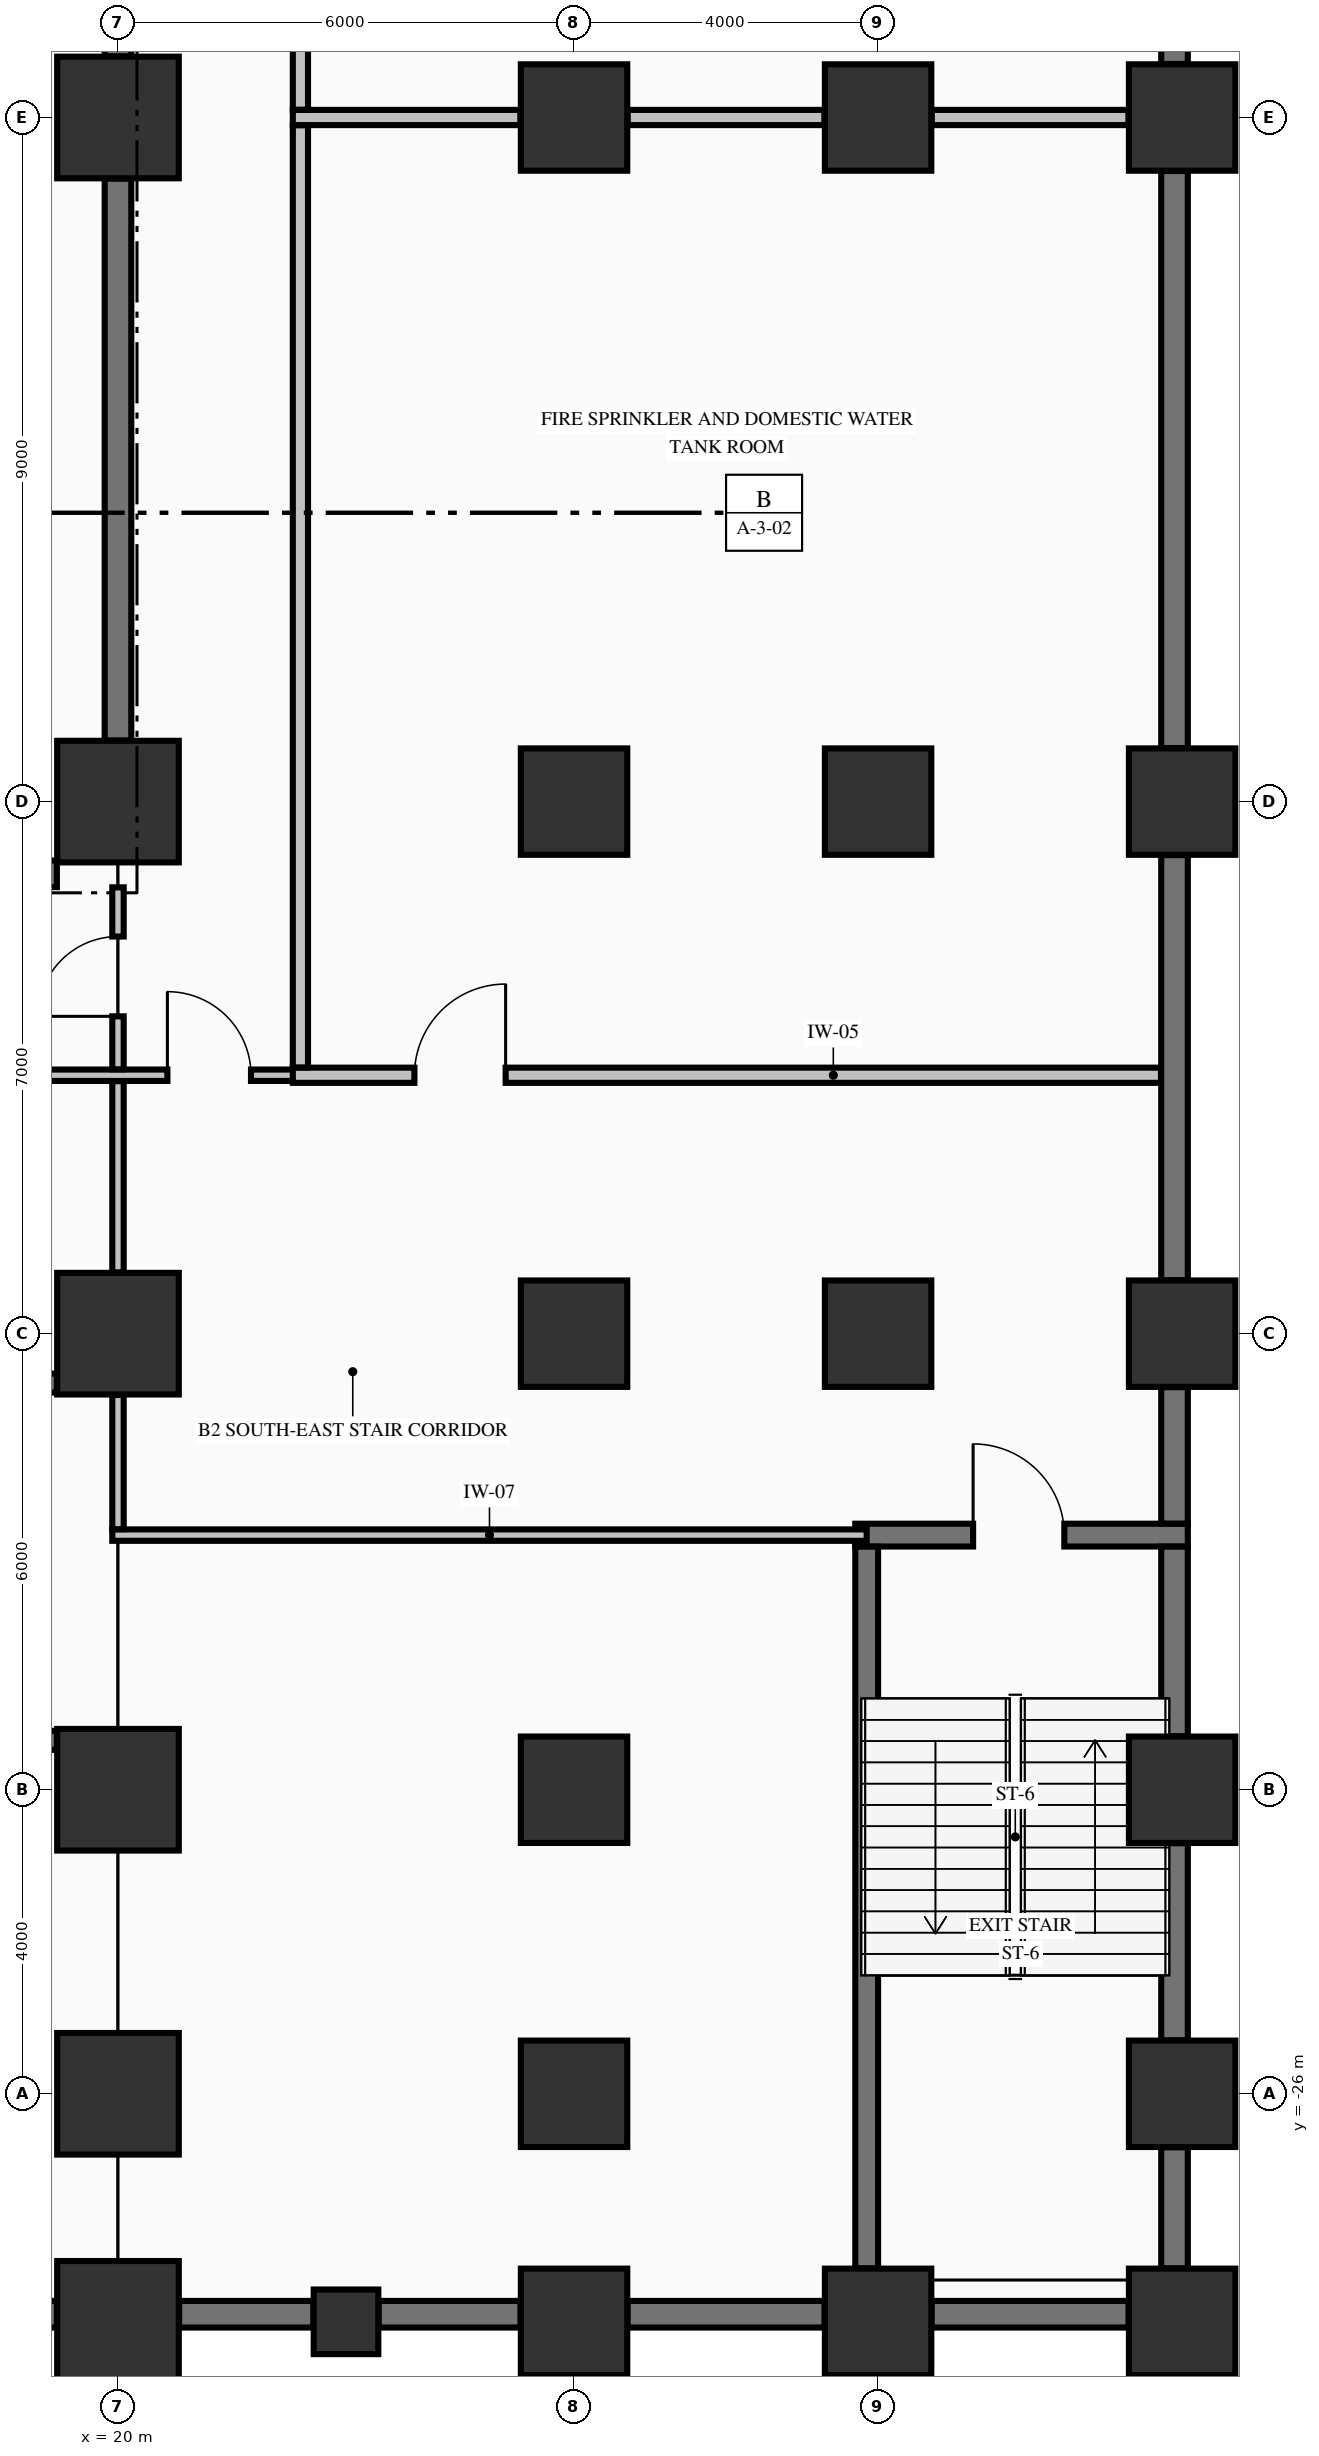
"""IFC4 building model, lengths in metres.
Left out: names, types, materials, properties, quantities, classifications, styles, units other than length and angle.
Written with IfcOpenShell. Run it as: python <this file> out.ifc"""

import sys

from ifc_helpers import new_model, si_unit, direction, frame, frame_2d, origin, origin_2d, place, context, subcontext, project, spatial, rectangle, extrude, element, fill, save


model = new_model("IFC4")
c1 = context("Model", 3, precision=1e-05, world=origin(), true_north=direction((0.0, 1.0)))
c2 = subcontext(c1, "Body", "Model", "MODEL_VIEW")
j1 = project(units=[si_unit("LENGTHUNIT", "METRE"), si_unit("PLANEANGLEUNIT", "RADIAN")], contexts=[c1])
p1 = place(None, origin())
s1 = spatial("IfcSite", under=j1, at=p1, CompositionType="ELEMENT")
p2 = place(p1, origin())
s2 = spatial("IfcBuilding", under=s1, at=p2, CompositionType="ELEMENT")
p3 = place(p2, frame((0.0, 0.0, -9.1)))
s3 = spatial("IfcBuildingStorey", under=s2, at=p3, CompositionType="ELEMENT", Elevation=-9.1)
for number, where, z_axis, x_axis in (
    (1, (20.0, -29.0, -0.45), (0.0, 0.0, 1.0), (1.0, 0.0, 0.0)),
    (2, (20.0, -26.0, -0.45), (0.0, 0.0, 1.0), (1.0, 0.0, 0.0)),
    (3, (20.0, -22.0, -0.45), (0.0, 0.0, 1.0), (1.0, 0.0, 0.0)),
    (4, (20.0, -16.0, -0.45), (0.0, 0.0, 1.0), (1.0, 0.0, 0.0)),
    (5, (20.0, -9.0, -0.45), (0.0, 0.0, 1.0), (1.0, 0.0, 0.0)),
    (6, (20.0, 0.0, -0.45), (0.0, 0.0, 1.0), (1.0, 0.0, 0.0)),
):
    element("IfcColumn", number, at=place(p3, frame(where, z_axis=z_axis, x_axis=x_axis)), inside=s3, PredefinedType="COLUMN", context=c2, shape_type="SweptSolid", body=[
        extrude(rectangle(XDim=1.6, YDim=1.6, at=origin_2d()), origin(), (0.0, 0.0, 1.0), 4.65),
    ])
for number, where, z_axis, x_axis in (
    (7, (26.0, -29.0, -0.45), (0.0, 0.0, 1.0), (1.0, 0.0, 0.0)),
    (8, (26.0, -26.0, -0.45), (0.0, 0.0, 1.0), (1.0, 0.0, 0.0)),
    (9, (26.0, -22.0, -0.45), (0.0, 0.0, 1.0), (1.0, 0.0, 0.0)),
    (10, (26.0, -16.0, -0.45), (0.0, 0.0, 1.0), (1.0, 0.0, 0.0)),
    (11, (26.0, -9.0, -0.45), (0.0, 0.0, 1.0), (1.0, 0.0, 0.0)),
    (12, (26.0, 0.0, -0.45), (0.0, 0.0, 1.0), (1.0, 0.0, 0.0)),
    (13, (30.0, -29.0, -0.45), (0.0, 0.0, 1.0), (1.0, 0.0, 0.0)),
    (14, (30.0, -16.0, -0.45), (0.0, 0.0, 1.0), (1.0, 0.0, 0.0)),
    (15, (30.0, -9.0, -0.45), (0.0, 0.0, 1.0), (1.0, 0.0, 0.0)),
    (16, (30.0, 0.0, -0.45), (0.0, 0.0, 1.0), (1.0, 0.0, 0.0)),
    (17, (34.0, -29.0, -0.45), (0.0, 0.0, 1.0), (1.0, 0.0, 0.0)),
    (18, (34.0, -26.0, -0.45), (0.0, 0.0, 1.0), (1.0, 0.0, 0.0)),
    (19, (34.0, -22.0, -0.45), (0.0, 0.0, 1.0), (1.0, 0.0, 0.0)),
    (20, (34.0, -16.0, -0.45), (0.0, 0.0, 1.0), (1.0, 0.0, 0.0)),
    (21, (34.0, -9.0, -0.45), (0.0, 0.0, 1.0), (1.0, 0.0, 0.0)),
    (22, (34.0, 0.0, -0.45), (0.0, 0.0, 1.0), (1.0, 0.0, 0.0)),
):
    element("IfcColumn", number, at=place(p3, frame(where, z_axis=z_axis, x_axis=x_axis)), inside=s3, PredefinedType="COLUMN", context=c2, shape_type="SweptSolid", body=[
        extrude(rectangle(XDim=1.4, YDim=1.4, at=origin_2d()), origin(), (0.0, 0.0, 1.0), 4.65),
    ])
p4 = place(p3, frame((23.0, -29.0, -0.45), z_axis=(0.0, 0.0, 1.0), x_axis=(1.0, 0.0, 0.0)))
e23 = element("IfcColumn", 23, at=p4, inside=s3, PredefinedType="PILASTER", context=c2, shape_type="SweptSolid", body=[
    extrude(rectangle(XDim=0.85, YDim=0.85, at=origin_2d()), origin(), (0.0, 0.0, 1.0), 4.65),
])
p5 = place(p3, frame((11.804, -28.9, 0.0), z_axis=(0.0, 0.0, 1.0), x_axis=(1.0, 0.0, 0.0)))
e24 = element("IfcWall", 24, at=p5, inside=s3, PredefinedType="SHEAR", context=c2, shape_type="SweptSolid", body=[
    extrude(rectangle(XDim=7.392, YDim=0.35, at=frame_2d((3.696, 0.0))), origin(), (0.0, 0.0, 1.0), 4.2),
])
p6 = place(p3, frame((20.804, -28.9, 0.0), z_axis=(0.0, 0.0, 1.0), x_axis=(1.0, 0.0, 0.0)))
e25 = element("IfcWall", 25, at=p6, inside=s3, PredefinedType="SHEAR", context=c2, shape_type="SweptSolid", body=[
    extrude(rectangle(XDim=1.767, YDim=0.35, at=frame_2d((0.884, 0.0))), origin(), (0.0, 0.0, 1.0), 4.2),
])
p7 = place(p3, frame((23.429, -28.9, 0.0), z_axis=(0.0, 0.0, 1.0), x_axis=(1.0, 0.0, 0.0)))
e26 = element("IfcWall", 26, at=p7, inside=s3, PredefinedType="SHEAR", context=c2, shape_type="SweptSolid", body=[
    extrude(rectangle(XDim=1.867, YDim=0.35, at=frame_2d((0.934, 0.0))), origin(), (0.0, 0.0, 1.0), 4.2),
])
for number, where, z_axis, x_axis in (
    (27, (26.704, -28.9, 0.0), (0.0, 0.0, 1.0), (1.0, 0.0, 0.0)),
    (28, (30.704, -28.9, 0.0), (0.0, 0.0, 1.0), (1.0, 0.0, 0.0)),
):
    element("IfcWall", number, at=place(p3, frame(where, z_axis=z_axis, x_axis=x_axis)), inside=s3, PredefinedType="SHEAR", context=c2, shape_type="SweptSolid", body=[
        extrude(rectangle(XDim=2.592, YDim=0.35, at=frame_2d((1.296, 0.0))), origin(), (0.0, 0.0, 1.0), 4.2),
    ])
p8 = place(p3, frame((11.804, -21.35, 0.0), z_axis=(0.0, 0.0, 1.0), x_axis=(1.0, 0.0, 0.0)))
e29 = element("IfcWall", 29, at=p8, inside=s3, PredefinedType="SOLIDWALL", context=c2, shape_type="SweptSolid", body=[
    extrude(rectangle(XDim=7.392, YDim=0.25, at=frame_2d((3.696, 0.0))), origin(), (0.0, 0.0, 1.0), 4.2),
])
p9 = place(p3, frame((29.7, -18.65, 0.0), z_axis=(0.0, 0.0, 1.0), x_axis=(1.0, 0.0, 0.0)))
e30 = element("IfcWall", 30, at=p9, inside=s3, PredefinedType="SHEAR", context=c2, shape_type="SweptSolid", body=[
    extrude(rectangle(XDim=4.375, YDim=0.3, at=frame_2d((2.188, 0.0))), origin(), (0.0, 0.0, 1.0), 4.2),
])
p10 = place(p9, frame((1.55, 0.0, 0.0)))
e31 = element("IfcOpeningElement", 31, at=p10, cuts=e30, PredefinedType="OPENING", context=c2, shape_type="SweptSolid", body=[
    extrude(rectangle(XDim=1.2, YDim=2.15, at=frame_2d((0.6, 1.075))), frame((0.0, 0.16, 0.0), z_axis=(0.0, -1.0, 0.0), x_axis=(1.0, 0.0, 0.0)), (0.0, 0.0, 1.0), 0.32),
])
p11 = place(p3, frame((11.804, -16.65, 0.0), z_axis=(0.0, 0.0, 1.0), x_axis=(1.0, 0.0, 0.0)))
e32 = element("IfcWall", 32, at=p11, inside=s3, PredefinedType="SOLIDWALL", context=c2, shape_type="SweptSolid", body=[
    extrude(rectangle(XDim=7.392, YDim=0.25, at=frame_2d((3.696, 0.0))), origin(), (0.0, 0.0, 1.0), 4.2),
])
p12 = place(p3, frame((14.7, -9.95, 0.0), z_axis=(0.0, 0.0, 1.0), x_axis=(1.0, 0.0, 0.0)))
e33 = element("IfcWall", 33, at=p12, inside=s3, PredefinedType="SHEAR", context=c2, shape_type="SweptSolid", body=[
    extrude(rectangle(XDim=4.496, YDim=0.35, at=frame_2d((2.248, 0.0))), origin(), (0.0, 0.0, 1.0), 4.2),
])
p13 = place(p3, frame((19.925, -18.65, 0.0), z_axis=(0.0, 0.0, 1.0), x_axis=(1.0, 0.0, 0.0)))
e34 = element("IfcWall", 34, at=p13, inside=s3, PredefinedType="PARTITIONING", context=c2, shape_type="SweptSolid", body=[
    extrude(rectangle(XDim=9.925, YDim=0.15, at=frame_2d((4.962, 0.0))), origin(), (0.0, 0.0, 1.0), 4.2),
])
p14 = place(p3, frame((-33.722, -12.6, 0.0), z_axis=(0.0, 0.0, 1.0), x_axis=(1.0, 0.0, 0.0)))
e35 = element("IfcWall", 35, at=p14, inside=s3, PredefinedType="PARTITIONING", context=c2, shape_type="SweptSolid", body=[
    extrude(rectangle(XDim=56.222, YDim=0.15, at=frame_2d((28.111, 0.0))), origin(), (0.0, 0.0, 1.0), 3.74),
])
p15 = place(p14, frame((11.972, 0.0, 0.0)))
e36 = element("IfcOpeningElement", 36, at=p15, cuts=e35, PredefinedType="OPENING", context=c2, shape_type="SweptSolid", body=[
    extrude(rectangle(XDim=1.1, YDim=2.15, at=frame_2d((0.55, 1.075))), frame((0.0, 0.085, 0.0), z_axis=(0.0, -1.0, 0.0), x_axis=(1.0, 0.0, 0.0)), (0.0, 0.0, 1.0), 0.17),
])
p16 = place(p14, frame((54.372, 0.0, 0.0)))
e37 = element("IfcOpeningElement", 37, at=p16, cuts=e35, PredefinedType="OPENING", context=c2, shape_type="SweptSolid", body=[
    extrude(rectangle(XDim=1.1, YDim=2.15, at=frame_2d((0.55, 1.075))), frame((0.0, 0.085, 0.0), z_axis=(0.0, -1.0, 0.0), x_axis=(1.0, 0.0, 0.0)), (0.0, 0.0, 1.0), 0.17),
])
p17 = place(p14, frame((38.622, 0.0, 0.0)))
e38 = element("IfcOpeningElement", 38, at=p17, cuts=e35, PredefinedType="OPENING", context=c2, shape_type="SweptSolid", body=[
    extrude(rectangle(XDim=1.2, YDim=2.15, at=frame_2d((0.6, 1.075))), frame((0.0, 0.085, 0.0), z_axis=(0.0, -1.0, 0.0), x_axis=(1.0, 0.0, 0.0)), (0.0, 0.0, 1.0), 0.17),
])
p18 = place(p3, frame((22.3, -12.6, 0.0), z_axis=(0.0, 0.0, 1.0), x_axis=(1.0, 0.0, 0.0)))
e39 = element("IfcWall", 39, at=p18, inside=s3, PredefinedType="PARTITIONING", context=c2, shape_type="SweptSolid", body=[
    extrude(rectangle(XDim=11.422, YDim=0.2, at=frame_2d((5.711, 0.0))), origin(), (0.0, 0.0, 1.0), 3.74),
])
p19 = place(p18, frame((1.6, 0.0, 0.0)))
e40 = element("IfcOpeningElement", 40, at=p19, cuts=e39, PredefinedType="OPENING", context=c2, shape_type="SweptSolid", body=[
    extrude(rectangle(XDim=1.2, YDim=2.15, at=frame_2d((0.6, 1.075))), frame((0.0, 0.11, 0.0), z_axis=(0.0, -1.0, 0.0), x_axis=(1.0, 0.0, 0.0)), (0.0, 0.0, 1.0), 0.22),
])
p20 = place(p3, frame((22.3, 0.0, 0.0), z_axis=(0.0, 0.0, 1.0), x_axis=(1.0, 0.0, 0.0)))
e41 = element("IfcWall", 41, at=p20, inside=s3, PredefinedType="PARTITIONING", context=c2, shape_type="SweptSolid", body=[
    extrude(rectangle(XDim=2.994, YDim=0.2, at=frame_2d((1.497, 0.0))), origin(), (0.0, 0.0, 1.0), 3.242),
])
for number, where, z_axis, x_axis in (
    (42, (26.706, 0.0, 0.0), (0.0, 0.0, 1.0), (1.0, 0.0, 0.0)),
    (43, (30.706, 0.0, 0.0), (0.0, 0.0, 1.0), (1.0, 0.0, 0.0)),
):
    element("IfcWall", number, at=place(p3, frame(where, z_axis=z_axis, x_axis=x_axis)), inside=s3, PredefinedType="PARTITIONING", context=c2, shape_type="SweptSolid", body=[
        extrude(rectangle(XDim=2.588, YDim=0.2, at=frame_2d((1.294, 0.0))), origin(), (0.0, 0.0, 1.0), 3.242),
    ])
for number, where, z_axis, x_axis in (
    (44, (20.0, -8.196, 0.0), (0.0, 0.0, 1.0), (0.0, 1.0, 0.0)),
    (45, (20.0, 0.804, 0.0), (0.0, 0.0, 1.0), (0.0, 1.0, 0.0)),
):
    element("IfcWall", number, at=place(p3, frame(where, z_axis=z_axis, x_axis=x_axis)), inside=s3, PredefinedType="SHEAR", context=c2, shape_type="SweptSolid", body=[
        extrude(rectangle(XDim=7.392, YDim=0.35, at=frame_2d((3.696, 0.0))), origin(), (0.0, 0.0, 1.0), 4.2),
    ])
p21 = place(p3, frame((29.85, -28.296, 0.0), z_axis=(0.0, 0.0, 1.0), x_axis=(0.0, 1.0, 0.0)))
e46 = element("IfcWall", 46, at=p21, inside=s3, PredefinedType="SHEAR", context=c2, shape_type="SweptSolid", body=[
    extrude(rectangle(XDim=9.494, YDim=0.3, at=frame_2d((4.747, 0.0))), origin(), (0.0, 0.0, 1.0), 4.2),
])
p22 = place(p3, frame((33.9, -28.296, 0.0), z_axis=(0.0, 0.0, 1.0), x_axis=(0.0, 1.0, 0.0)))
e47 = element("IfcWall", 47, at=p22, inside=s3, PredefinedType="SHEAR", context=c2, shape_type="SweptSolid", body=[
    extrude(rectangle(XDim=1.592, YDim=0.35, at=frame_2d((0.796, 0.0))), origin(), (0.0, 0.0, 1.0), 4.2),
])
p23 = place(p3, frame((33.9, -25.296, 0.0), z_axis=(0.0, 0.0, 1.0), x_axis=(0.0, 1.0, 0.0)))
e48 = element("IfcWall", 48, at=p23, inside=s3, PredefinedType="SHEAR", context=c2, shape_type="SweptSolid", body=[
    extrude(rectangle(XDim=2.592, YDim=0.35, at=frame_2d((1.296, 0.0))), origin(), (0.0, 0.0, 1.0), 4.2),
])
p24 = place(p3, frame((33.9, -21.296, 0.0), z_axis=(0.0, 0.0, 1.0), x_axis=(0.0, 1.0, 0.0)))
e49 = element("IfcWall", 49, at=p24, inside=s3, PredefinedType="SHEAR", context=c2, shape_type="SweptSolid", body=[
    extrude(rectangle(XDim=2.494, YDim=0.35, at=frame_2d((1.247, 0.0))), origin(), (0.0, 0.0, 1.0), 4.2),
])
p25 = place(p3, frame((33.9, -18.498, 0.0), z_axis=(0.0, 0.0, 1.0), x_axis=(0.0, 1.0, 0.0)))
e50 = element("IfcWall", 50, at=p25, inside=s3, PredefinedType="SHEAR", context=c2, shape_type="SweptSolid", body=[
    extrude(rectangle(XDim=1.794, YDim=0.35, at=frame_2d((0.897, 0.0))), origin(), (0.0, 0.0, 1.0), 4.2),
])
p26 = place(p3, frame((33.9, -15.296, 0.0), z_axis=(0.0, 0.0, 1.0), x_axis=(0.0, 1.0, 0.0)))
e51 = element("IfcWall", 51, at=p26, inside=s3, PredefinedType="SHEAR", context=c2, shape_type="SweptSolid", body=[
    extrude(rectangle(XDim=5.592, YDim=0.35, at=frame_2d((2.796, 0.0))), origin(), (0.0, 0.0, 1.0), 4.2),
])
for number, where, z_axis, x_axis in (
    (52, (33.9, -8.296, 0.0), (0.0, 0.0, 1.0), (0.0, 1.0, 0.0)),
    (53, (33.9, 0.704, 0.0), (0.0, 0.0, 1.0), (0.0, 1.0, 0.0)),
):
    element("IfcWall", number, at=place(p3, frame(where, z_axis=z_axis, x_axis=x_axis)), inside=s3, PredefinedType="SHEAR", context=c2, shape_type="SweptSolid", body=[
        extrude(rectangle(XDim=7.592, YDim=0.35, at=frame_2d((3.796, 0.0))), origin(), (0.0, 0.0, 1.0), 4.2),
    ])
p27 = place(p3, frame((20.0, -18.572, 0.0), z_axis=(0.0, 0.0, 1.0), x_axis=(0.0, 1.0, 0.0)))
e54 = element("IfcWall", 54, at=p27, inside=s3, PredefinedType="PARTITIONING", context=c2, shape_type="SweptSolid", body=[
    extrude(rectangle(XDim=1.766, YDim=0.15, at=frame_2d((0.883, 0.0))), origin(), (0.0, 0.0, 1.0), 3.242),
])
p28 = place(p3, frame((20.0, -15.194, 0.0), z_axis=(0.0, 0.0, 1.0), x_axis=(0.0, 1.0, 0.0)))
e55 = element("IfcWall", 55, at=p28, inside=s3, PredefinedType="PARTITIONING", context=c2, shape_type="SweptSolid", body=[
    extrude(rectangle(XDim=2.516, YDim=0.15, at=frame_2d((1.258, 0.0))), origin(), (0.0, 0.0, 1.0), 3.242),
])
p29 = place(p3, frame((20.0, -12.522, 0.0), z_axis=(0.0, 0.0, 1.0), x_axis=(0.0, 1.0, 0.0)))
e56 = element("IfcWall", 56, at=p29, inside=s3, PredefinedType="PARTITIONING", context=c2, shape_type="SweptSolid", body=[
    extrude(rectangle(XDim=2.394, YDim=0.15, at=frame_2d((1.197, 0.0))), origin(), (0.0, 0.0, 1.0), 3.242),
])
p30 = place(p29, frame((0.697, 0.0, 0.0)))
e57 = element("IfcOpeningElement", 57, at=p30, cuts=e56, PredefinedType="OPENING", context=c2, shape_type="SweptSolid", body=[
    extrude(rectangle(XDim=1.05, YDim=2.15, at=frame_2d((0.525, 1.075))), frame((0.0, 0.085, 0.0), z_axis=(0.0, -1.0, 0.0), x_axis=(1.0, 0.0, 0.0)), (0.0, 0.0, 1.0), 0.17),
])
p31 = place(p3, frame((22.4, -12.497, 0.0), z_axis=(0.0, 0.0, 1.0), x_axis=(0.0, 1.0, 0.0)))
e58 = element("IfcWall", 58, at=p31, inside=s3, PredefinedType="PARTITIONING", context=c2, shape_type="SweptSolid", body=[
    extrude(rectangle(XDim=12.394, YDim=0.2, at=frame_2d((6.197, 0.0))), origin(), (0.0, 0.0, 1.0), 4.2),
])
p32 = place(p3, frame((22.4, 0.103, 0.0), z_axis=(0.0, 0.0, 1.0), x_axis=(0.0, 1.0, 0.0)))
e59 = element("IfcWall", 59, at=p32, inside=s3, PredefinedType="PARTITIONING", context=c2, shape_type="SweptSolid", body=[
    extrude(rectangle(XDim=12.994, YDim=0.2, at=frame_2d((6.497, 0.0))), origin(), (0.0, 0.0, 1.0), 4.2),
])
p33 = place(p10, origin())
e60 = element("IfcDoor", 60, at=p33, inside=s3, OperationType="SINGLE_SWING_LEFT", PredefinedType="DOOR", context=c2, shape_type="SweptSolid", body=[
    extrude(rectangle(XDim=1.2, YDim=2.15, at=frame_2d((0.6, 1.075))), frame((0.0, 0.025, 0.0), z_axis=(0.0, -1.0, 0.0), x_axis=(1.0, 0.0, 0.0)), (0.0, 0.0, 1.0), 0.05),
])
fill(e31, e60)
p34 = place(p30, origin())
e61 = element("IfcDoor", 61, at=p34, inside=s3, OperationType="SINGLE_SWING_LEFT", PredefinedType="DOOR", context=c2, shape_type="SweptSolid", body=[
    extrude(rectangle(XDim=1.05, YDim=2.15, at=frame_2d((0.525, 1.075))), frame((0.0, 0.025, 0.0), z_axis=(0.0, -1.0, 0.0), x_axis=(1.0, 0.0, 0.0)), (0.0, 0.0, 1.0), 0.05),
])
fill(e57, e61)
p35 = place(p16, origin())
e62 = element("IfcDoor", 62, at=p35, inside=s3, OperationType="SINGLE_SWING_LEFT", PredefinedType="DOOR", context=c2, shape_type="SweptSolid", body=[
    extrude(rectangle(XDim=1.1, YDim=2.15, at=frame_2d((0.55, 1.075))), frame((0.0, 0.025, 0.0), z_axis=(0.0, -1.0, 0.0), x_axis=(1.0, 0.0, 0.0)), (0.0, 0.0, 1.0), 0.05),
])
fill(e37, e62)
p36 = place(p19, origin())
e63 = element("IfcDoor", 63, at=p36, inside=s3, OperationType="SINGLE_SWING_RIGHT", PredefinedType="DOOR", context=c2, shape_type="SweptSolid", body=[
    extrude(rectangle(XDim=1.2, YDim=2.15, at=frame_2d((0.6, 1.075))), frame((0.0, 0.025, 0.0), z_axis=(0.0, -1.0, 0.0), x_axis=(1.0, 0.0, 0.0)), (0.0, 0.0, 1.0), 0.05),
])
fill(e40, e63)
save(model, sys.argv[1])
